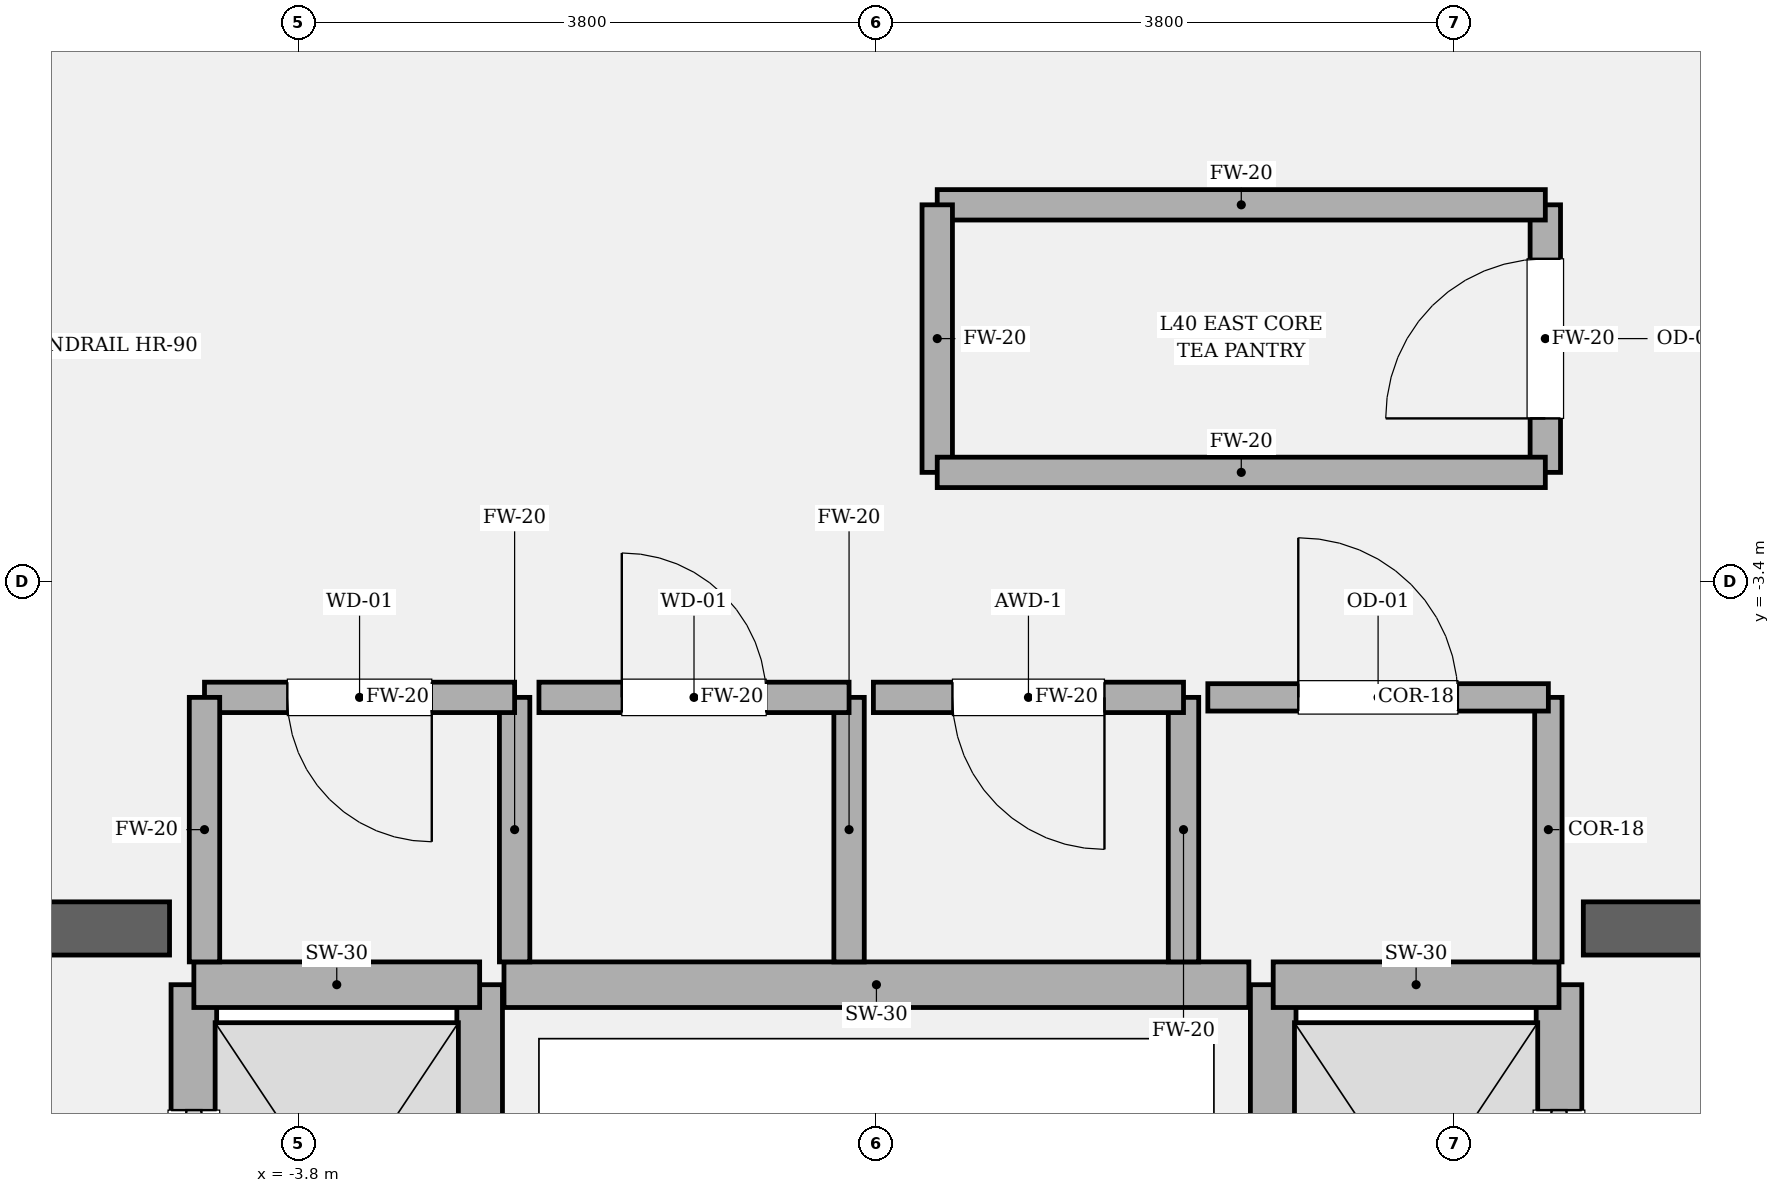
"""IFC4 building model, lengths in metres.
Left out: names, types, materials, properties, quantities, classifications, styles, units other than length and angle.
Written with IfcOpenShell. Run it as: python <this file> out.ifc"""

import sys

from ifc_helpers import new_model, si_unit, direction, frame, frame_2d, origin, place, context, subcontext, project, spatial, rectangle, extrude, element, fill, save


model = new_model("IFC4")
c1 = context("Model", 3, precision=1e-05, world=origin(), true_north=direction((0.0, 1.0)))
c2 = subcontext(c1, "Body", "Model", "MODEL_VIEW")
j1 = project(units=[si_unit("LENGTHUNIT", "METRE"), si_unit("PLANEANGLEUNIT", "RADIAN")], contexts=[c1])
p1 = place(None, origin())
s1 = spatial("IfcSite", under=j1, at=p1, CompositionType="ELEMENT")
p2 = place(p1, origin())
s2 = spatial("IfcBuilding", under=s1, at=p2, CompositionType="ELEMENT")
p3 = place(p2, frame((0.0, 0.0, 172.2)))
s3 = spatial("IfcBuildingStorey", under=s2, at=p3, CompositionType="ELEMENT", Elevation=172.2)
p4 = place(p3, frame((-9.875, -5.68, 0.0), z_axis=(0.0, 0.0, 1.0), x_axis=(1.0, 0.0, 0.0)))
e1 = element("IfcWall", 1, at=p4, inside=s3, PredefinedType="SOLIDWALL", context=c2, shape_type="SweptSolid", body=[
    extrude(rectangle(XDim=5.225, YDim=0.35, at=frame_2d((2.613, 0.0))), origin(), (0.0, 0.0, 1.0), 4.05),
])
p5 = place(p4, frame((1.335, 0.0, 0.0)))
e2 = element("IfcOpeningElement", 2, at=p5, cuts=e1, PredefinedType="OPENING", context=c2, shape_type="SweptSolid", body=[
    extrude(rectangle(XDim=1.18, YDim=2.2, at=frame_2d((0.59, 1.1))), frame((0.0, 0.185, 0.0), z_axis=(0.0, -1.0, 0.0), x_axis=(1.0, 0.0, 0.0)), (0.0, 0.0, 1.0), 0.37),
])
p6 = place(p3, frame((4.65, -5.68, 0.0), z_axis=(0.0, 0.0, 1.0), x_axis=(1.0, 0.0, 0.0)))
e3 = element("IfcWall", 3, at=p6, inside=s3, PredefinedType="SOLIDWALL", context=c2, shape_type="SweptSolid", body=[
    extrude(rectangle(XDim=5.225, YDim=0.35, at=frame_2d((2.613, 0.0))), origin(), (0.0, 0.0, 1.0), 4.05),
])
p7 = place(p6, frame((2.71, 0.0, 0.0)))
e4 = element("IfcOpeningElement", 4, at=p7, cuts=e3, PredefinedType="OPENING", context=c2, shape_type="SweptSolid", body=[
    extrude(rectangle(XDim=1.18, YDim=2.2, at=frame_2d((0.59, 1.1))), frame((0.0, 0.185, 0.0), z_axis=(0.0, -1.0, 0.0), x_axis=(1.0, 0.0, 0.0)), (0.0, 0.0, 1.0), 0.37),
])
p8 = place(p3, frame((-4.49, -8.82, 0.0), z_axis=(0.0, 0.0, 1.0), x_axis=(0.0, 1.0, 0.0)))
e5 = element("IfcWall", 5, at=p8, inside=s3, PredefinedType="SOLIDWALL", context=c2, shape_type="SweptSolid", body=[
    extrude(rectangle(XDim=2.77, YDim=0.3, at=frame_2d((1.385, 0.0))), origin(), (0.0, 0.0, 1.0), 3.83),
])
p9 = place(p8, frame((0.825, 0.0, 0.0)))
e6 = element("IfcOpeningElement", 6, at=p9, cuts=e5, PredefinedType="OPENING", context=c2, shape_type="SweptSolid", body=[
    extrude(rectangle(XDim=1.12, YDim=2.25, at=frame_2d((0.56, 1.125))), frame((0.0, 0.16, 0.0), z_axis=(0.0, -1.0, 0.0), x_axis=(1.0, 0.0, 0.0)), (0.0, 0.0, 1.0), 0.32),
])
p10 = place(p3, frame((-2.61, -8.82, 0.0), z_axis=(0.0, 0.0, 1.0), x_axis=(0.0, 1.0, 0.0)))
e7 = element("IfcWall", 7, at=p10, inside=s3, PredefinedType="SOLIDWALL", context=c2, shape_type="SweptSolid", body=[
    extrude(rectangle(XDim=2.77, YDim=0.3, at=frame_2d((1.385, 0.0))), origin(), (0.0, 0.0, 1.0), 3.83),
])
p11 = place(p3, frame((-4.49, -6.05, 0.0), z_axis=(0.0, 0.0, 1.0), x_axis=(1.0, 0.0, 0.0)))
e8 = element("IfcWall", 8, at=p11, inside=s3, PredefinedType="SOLIDWALL", context=c2, shape_type="SweptSolid", body=[
    extrude(rectangle(XDim=1.88, YDim=0.3, at=frame_2d((0.94, 0.0))), origin(), (0.0, 0.0, 1.0), 3.83),
])
p12 = place(p3, frame((4.49, -8.82, 0.0), z_axis=(0.0, 0.0, 1.0), x_axis=(0.0, 1.0, 0.0)))
e9 = element("IfcWall", 9, at=p12, inside=s3, PredefinedType="SOLIDWALL", context=c2, shape_type="SweptSolid", body=[
    extrude(rectangle(XDim=2.77, YDim=0.3, at=frame_2d((1.385, 0.0))), origin(), (0.0, 0.0, 1.0), 3.83),
])
p13 = place(p12, frame((0.825, 0.0, 0.0)))
e10 = element("IfcOpeningElement", 10, at=p13, cuts=e9, PredefinedType="OPENING", context=c2, shape_type="SweptSolid", body=[
    extrude(rectangle(XDim=1.12, YDim=2.25, at=frame_2d((0.56, 1.125))), frame((0.0, 0.16, 0.0), z_axis=(0.0, -1.0, 0.0), x_axis=(1.0, 0.0, 0.0)), (0.0, 0.0, 1.0), 0.32),
])
p14 = place(p3, frame((2.61, -8.82, 0.0), z_axis=(0.0, 0.0, 1.0), x_axis=(0.0, 1.0, 0.0)))
e11 = element("IfcWall", 11, at=p14, inside=s3, PredefinedType="SOLIDWALL", context=c2, shape_type="SweptSolid", body=[
    extrude(rectangle(XDim=2.77, YDim=0.3, at=frame_2d((1.385, 0.0))), origin(), (0.0, 0.0, 1.0), 3.83),
])
p15 = place(p3, frame((2.61, -6.05, 0.0), z_axis=(0.0, 0.0, 1.0), x_axis=(1.0, 0.0, 0.0)))
e12 = element("IfcWall", 12, at=p15, inside=s3, PredefinedType="SOLIDWALL", context=c2, shape_type="SweptSolid", body=[
    extrude(rectangle(XDim=1.88, YDim=0.3, at=frame_2d((0.94, 0.0))), origin(), (0.0, 0.0, 1.0), 3.83),
])
p16 = place(p3, frame((-2.45, -6.05, 0.0), z_axis=(0.0, 0.0, 1.0), x_axis=(1.0, 0.0, 0.0)))
e13 = element("IfcWall", 13, at=p16, inside=s3, PredefinedType="SOLIDWALL", context=c2, shape_type="SweptSolid", body=[
    extrude(rectangle(XDim=4.9, YDim=0.3, at=frame_2d((2.45, 0.0))), origin(), (0.0, 0.0, 1.0), 3.83),
])
p17 = place(p3, frame((-2.38, -5.9, 0.0), z_axis=(0.0, 0.0, 1.0), x_axis=(0.0, 1.0, 0.0)))
e14 = element("IfcWall", 14, at=p17, inside=s3, PredefinedType="SOLIDWALL", context=c2, shape_type="SweptSolid", body=[
    extrude(rectangle(XDim=1.74, YDim=0.2, at=frame_2d((0.87, 0.0))), origin(), (0.0, 0.0, 1.0), 3.83),
])
p18 = place(p3, frame((-2.38, -4.16, 0.0), z_axis=(0.0, 0.0, 1.0), x_axis=(-1.0, 0.0, 0.0)))
e15 = element("IfcWall", 15, at=p18, inside=s3, PredefinedType="SOLIDWALL", context=c2, shape_type="SweptSolid", body=[
    extrude(rectangle(XDim=2.04, YDim=0.2, at=frame_2d((1.02, 0.0))), origin(), (0.0, 0.0, 1.0), 3.83),
])
p19 = place(p18, frame((0.545, 0.0, 0.0)))
e16 = element("IfcOpeningElement", 16, at=p19, cuts=e15, PredefinedType="OPENING", context=c2, shape_type="SweptSolid", body=[
    extrude(rectangle(XDim=0.95, YDim=2.15, at=frame_2d((0.475, 1.075))), frame((0.0, 0.11, 0.0), z_axis=(0.0, -1.0, 0.0), x_axis=(1.0, 0.0, 0.0)), (0.0, 0.0, 1.0), 0.22),
])
for number, where, z_axis, x_axis in (
    (17, (-4.42, -4.16, 0.0), (0.0, 0.0, 1.0), (0.0, -1.0, 0.0)),
    (18, (-0.18, -5.9, 0.0), (0.0, 0.0, 1.0), (0.0, 1.0, 0.0)),
):
    element("IfcWall", number, at=place(p3, frame(where, z_axis=z_axis, x_axis=x_axis)), inside=s3, PredefinedType="SOLIDWALL", context=c2, shape_type="SweptSolid", body=[
        extrude(rectangle(XDim=1.74, YDim=0.2, at=frame_2d((0.87, 0.0))), origin(), (0.0, 0.0, 1.0), 3.83),
    ])
p20 = place(p3, frame((-0.18, -4.16, 0.0), z_axis=(0.0, 0.0, 1.0), x_axis=(-1.0, 0.0, 0.0)))
e19 = element("IfcWall", 19, at=p20, inside=s3, PredefinedType="SOLIDWALL", context=c2, shape_type="SweptSolid", body=[
    extrude(rectangle(XDim=2.04, YDim=0.2, at=frame_2d((1.02, 0.0))), origin(), (0.0, 0.0, 1.0), 3.83),
])
p21 = place(p20, frame((0.545, 0.0, 0.0)))
e20 = element("IfcOpeningElement", 20, at=p21, cuts=e19, PredefinedType="OPENING", context=c2, shape_type="SweptSolid", body=[
    extrude(rectangle(XDim=0.95, YDim=2.15, at=frame_2d((0.475, 1.075))), frame((0.0, 0.11, 0.0), z_axis=(0.0, -1.0, 0.0), x_axis=(1.0, 0.0, 0.0)), (0.0, 0.0, 1.0), 0.22),
])
p22 = place(p3, frame((2.02, -5.9, 0.0), z_axis=(0.0, 0.0, 1.0), x_axis=(0.0, 1.0, 0.0)))
e21 = element("IfcWall", 21, at=p22, inside=s3, PredefinedType="SOLIDWALL", context=c2, shape_type="SweptSolid", body=[
    extrude(rectangle(XDim=1.74, YDim=0.2, at=frame_2d((0.87, 0.0))), origin(), (0.0, 0.0, 1.0), 3.83),
])
p23 = place(p3, frame((2.02, -4.16, 0.0), z_axis=(0.0, 0.0, 1.0), x_axis=(-1.0, 0.0, 0.0)))
e22 = element("IfcWall", 22, at=p23, inside=s3, PredefinedType="SOLIDWALL", context=c2, shape_type="SweptSolid", body=[
    extrude(rectangle(XDim=2.04, YDim=0.2, at=frame_2d((1.02, 0.0))), origin(), (0.0, 0.0, 1.0), 3.83),
])
p24 = place(p23, frame((0.52, 0.0, 0.0)))
e23 = element("IfcOpeningElement", 23, at=p24, cuts=e22, PredefinedType="OPENING", context=c2, shape_type="SweptSolid", body=[
    extrude(rectangle(XDim=1.0, YDim=2.15, at=frame_2d((0.5, 1.075))), frame((0.0, 0.11, 0.0), z_axis=(0.0, -1.0, 0.0), x_axis=(1.0, 0.0, 0.0)), (0.0, 0.0, 1.0), 0.22),
])
p25 = place(p3, frame((4.42, -5.9, 0.0), z_axis=(0.0, 0.0, 1.0), x_axis=(0.0, 1.0, 0.0)))
e24 = element("IfcWall", 24, at=p25, inside=s3, PredefinedType="PARTITIONING", context=c2, shape_type="SweptSolid", body=[
    extrude(rectangle(XDim=1.74, YDim=0.18, at=frame_2d((0.87, 0.0))), origin(), (0.0, 0.0, 1.0), 3.83),
])
p26 = place(p3, frame((4.42, -4.16, 0.0), z_axis=(0.0, 0.0, 1.0), x_axis=(-1.0, 0.0, 0.0)))
e25 = element("IfcWall", 25, at=p26, inside=s3, PredefinedType="PARTITIONING", context=c2, shape_type="SweptSolid", body=[
    extrude(rectangle(XDim=2.24, YDim=0.18, at=frame_2d((1.12, 0.0))), origin(), (0.0, 0.0, 1.0), 3.83),
])
p27 = place(p26, frame((0.595, 0.0, 0.0)))
e26 = element("IfcOpeningElement", 26, at=p27, cuts=e25, PredefinedType="OPENING", context=c2, shape_type="SweptSolid", body=[
    extrude(rectangle(XDim=1.05, YDim=2.2, at=frame_2d((0.525, 1.1))), frame((0.0, 0.1, 0.0), z_axis=(0.0, -1.0, 0.0), x_axis=(1.0, 0.0, 0.0)), (0.0, 0.0, 1.0), 0.2),
])
p28 = place(p3, frame((4.4, -2.68, 0.0), z_axis=(0.0, 0.0, 1.0), x_axis=(0.0, 1.0, 0.0)))
e27 = element("IfcWall", 27, at=p28, inside=s3, PredefinedType="SOLIDWALL", context=c2, shape_type="SweptSolid", body=[
    extrude(rectangle(XDim=1.76, YDim=0.2, at=frame_2d((0.88, 0.0))), origin(), (0.0, 0.0, 1.0), 3.83),
])
p29 = place(p28, frame((0.355, 0.0, 0.0)))
e28 = element("IfcOpeningElement", 28, at=p29, cuts=e27, PredefinedType="OPENING", context=c2, shape_type="SweptSolid", body=[
    extrude(rectangle(XDim=1.05, YDim=2.2, at=frame_2d((0.525, 1.1))), frame((0.0, 0.11, 0.0), z_axis=(0.0, -1.0, 0.0), x_axis=(1.0, 0.0, 0.0)), (0.0, 0.0, 1.0), 0.22),
])
p30 = place(p3, frame((4.4, -0.92, 0.0), z_axis=(0.0, 0.0, 1.0), x_axis=(-1.0, 0.0, 0.0)))
e29 = element("IfcWall", 29, at=p30, inside=s3, PredefinedType="SOLIDWALL", context=c2, shape_type="SweptSolid", body=[
    extrude(rectangle(XDim=4.0, YDim=0.2, at=frame_2d((2.0, 0.0))), origin(), (0.0, 0.0, 1.0), 3.83),
])
p31 = place(p3, frame((0.4, -0.92, 0.0), z_axis=(0.0, 0.0, 1.0), x_axis=(0.0, -1.0, 0.0)))
e30 = element("IfcWall", 30, at=p31, inside=s3, PredefinedType="SOLIDWALL", context=c2, shape_type="SweptSolid", body=[
    extrude(rectangle(XDim=1.76, YDim=0.2, at=frame_2d((0.88, 0.0))), origin(), (0.0, 0.0, 1.0), 3.83),
])
p32 = place(p3, frame((0.4, -2.68, 0.0), z_axis=(0.0, 0.0, 1.0), x_axis=(1.0, 0.0, 0.0)))
e31 = element("IfcWall", 31, at=p32, inside=s3, PredefinedType="SOLIDWALL", context=c2, shape_type="SweptSolid", body=[
    extrude(rectangle(XDim=4.0, YDim=0.2, at=frame_2d((2.0, 0.0))), origin(), (0.0, 0.0, 1.0), 3.83),
])
p33 = place(p9, origin())
e32 = element("IfcDoor", 32, at=p33, inside=s3, OperationType="SLIDING_TO_LEFT", PredefinedType="DOOR", context=c2, shape_type="SweptSolid", body=[
    extrude(rectangle(XDim=1.12, YDim=2.25, at=frame_2d((0.56, 1.125))), frame((0.0, 0.025, 0.0), z_axis=(0.0, -1.0, 0.0), x_axis=(1.0, 0.0, 0.0)), (0.0, 0.0, 1.0), 0.05),
])
fill(e6, e32)
p34 = place(p13, origin())
e33 = element("IfcDoor", 33, at=p34, inside=s3, OperationType="SLIDING_TO_RIGHT", PredefinedType="DOOR", context=c2, shape_type="SweptSolid", body=[
    extrude(rectangle(XDim=1.12, YDim=2.25, at=frame_2d((0.56, 1.125))), frame((0.0, 0.025, 0.0), z_axis=(0.0, -1.0, 0.0), x_axis=(1.0, 0.0, 0.0)), (0.0, 0.0, 1.0), 0.05),
])
fill(e10, e33)
p35 = place(p19, origin())
e34 = element("IfcDoor", 34, at=p35, inside=s3, OperationType="SINGLE_SWING_LEFT", PredefinedType="DOOR", context=c2, shape_type="SweptSolid", body=[
    extrude(rectangle(XDim=0.95, YDim=2.15, at=frame_2d((0.475, 1.075))), frame((0.0, 0.025, 0.0), z_axis=(0.0, -1.0, 0.0), x_axis=(1.0, 0.0, 0.0)), (0.0, 0.0, 1.0), 0.05),
])
fill(e16, e34)
p36 = place(p21, origin())
e35 = element("IfcDoor", 35, at=p36, inside=s3, OperationType="SINGLE_SWING_RIGHT", PredefinedType="DOOR", context=c2, shape_type="SweptSolid", body=[
    extrude(rectangle(XDim=0.95, YDim=2.15, at=frame_2d((0.475, 1.075))), frame((0.0, 0.025, 0.0), z_axis=(0.0, -1.0, 0.0), x_axis=(1.0, 0.0, 0.0)), (0.0, 0.0, 1.0), 0.05),
])
fill(e20, e35)
p37 = place(p24, origin())
e36 = element("IfcDoor", 36, at=p37, inside=s3, OperationType="SINGLE_SWING_LEFT", PredefinedType="DOOR", context=c2, shape_type="SweptSolid", body=[
    extrude(rectangle(XDim=1.0, YDim=2.15, at=frame_2d((0.5, 1.075))), frame((0.0, 0.025, 0.0), z_axis=(0.0, -1.0, 0.0), x_axis=(1.0, 0.0, 0.0)), (0.0, 0.0, 1.0), 0.05),
])
fill(e23, e36)
p38 = place(p27, origin())
e37 = element("IfcDoor", 37, at=p38, inside=s3, OperationType="SINGLE_SWING_RIGHT", PredefinedType="DOOR", context=c2, shape_type="SweptSolid", body=[
    extrude(rectangle(XDim=1.05, YDim=2.2, at=frame_2d((0.525, 1.1))), frame((0.0, 0.025, 0.0), z_axis=(0.0, -1.0, 0.0), x_axis=(1.0, 0.0, 0.0)), (0.0, 0.0, 1.0), 0.05),
])
fill(e26, e37)
p39 = place(p29, origin())
e38 = element("IfcDoor", 38, at=p39, inside=s3, OperationType="SINGLE_SWING_LEFT", PredefinedType="DOOR", context=c2, shape_type="SweptSolid", body=[
    extrude(rectangle(XDim=1.05, YDim=2.2, at=frame_2d((0.525, 1.1))), frame((0.0, 0.025, 0.0), z_axis=(0.0, -1.0, 0.0), x_axis=(1.0, 0.0, 0.0)), (0.0, 0.0, 1.0), 0.05),
])
fill(e28, e38)
save(model, sys.argv[1])
